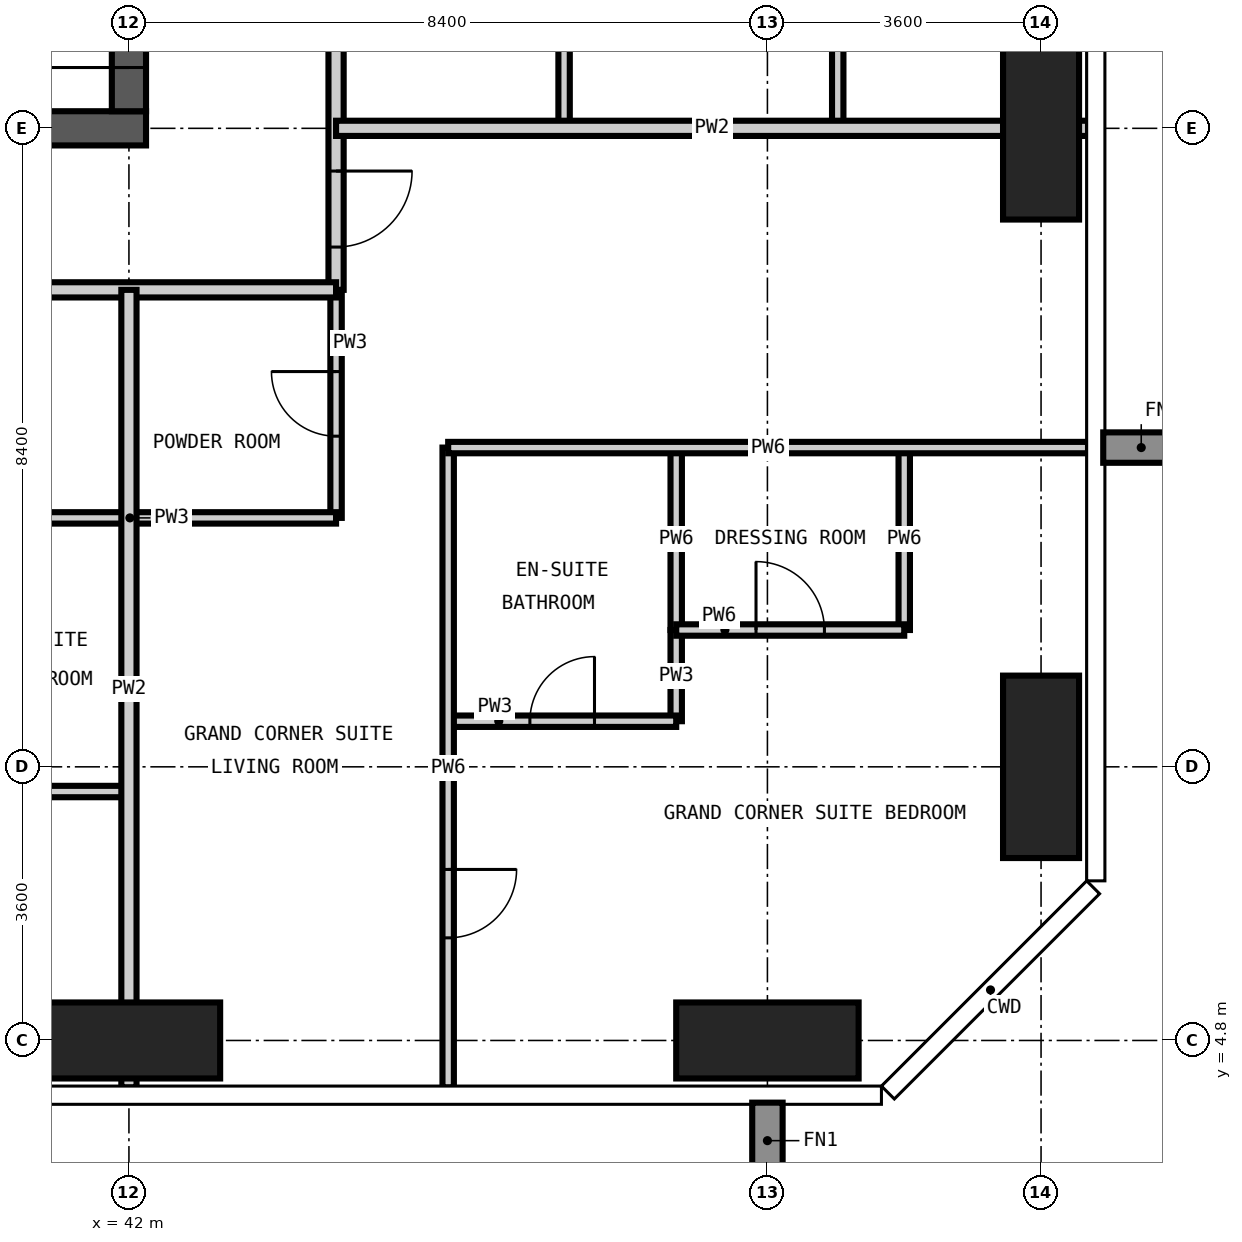
"""IFC4 building model, lengths in metres.
Left out: names, types, materials, properties, quantities, classifications, styles, units other than length and angle.
Written with IfcOpenShell. Run it as: python <this file> out.ifc"""

import sys

from ifc_helpers import new_model, si_unit, direction, frame, frame_2d, origin, origin_2d, place, context, subcontext, project, spatial, rectangle, extrude, element, fill, save


model = new_model("IFC4")
c1 = context("Model", 3, precision=1e-05, world=origin(), true_north=direction((0.0, 1.0)))
c2 = subcontext(c1, "Body", "Model", "MODEL_VIEW")
j1 = project(units=[si_unit("LENGTHUNIT", "METRE"), si_unit("PLANEANGLEUNIT", "RADIAN")], contexts=[c1])
p1 = place(None, origin())
s1 = spatial("IfcSite", under=j1, at=p1, CompositionType="ELEMENT")
p2 = place(p1, origin())
s2 = spatial("IfcBuilding", under=s1, at=p2, CompositionType="ELEMENT")
p3 = place(p2, frame((0.0, 0.0, 252.9)))
s3 = spatial("IfcBuildingStorey", under=s2, at=p3, CompositionType="ELEMENT", Elevation=252.9)
for number, where, z_axis, x_axis in (
    (1, (42.0, 4.8, -0.35), (0.0, 0.0, 1.0), (1.0, 0.0, 0.0)),
    (2, (50.4, 4.8, -0.35), (0.0, 0.0, 1.0), (1.0, 0.0, 0.0)),
):
    element("IfcColumn", number, at=place(p3, frame(where, z_axis=z_axis, x_axis=x_axis)), inside=s3, PredefinedType="COLUMN", context=c2, shape_type="SweptSolid", body=[
        extrude(rectangle(XDim=2.4, YDim=1.0, at=origin_2d()), origin(), (0.0, 0.0, 1.0), 3.9),
    ])
for number, where, z_axis, x_axis in (
    (3, (54.0, 8.4, -0.35), (0.0, 0.0, 1.0), (1.0, 0.0, 0.0)),
    (4, (54.0, 16.8, -0.35), (0.0, 0.0, 1.0), (1.0, 0.0, 0.0)),
):
    element("IfcColumn", number, at=place(p3, frame(where, z_axis=z_axis, x_axis=x_axis)), inside=s3, PredefinedType="COLUMN", context=c2, shape_type="SweptSolid", body=[
        extrude(rectangle(XDim=1.0, YDim=2.4, at=origin_2d()), origin(), (0.0, 0.0, 1.0), 3.9),
    ])
p4 = place(p3, frame((24.975, 16.8, -0.35), z_axis=(0.0, 0.0, 1.0), x_axis=(1.0, 0.0, 0.0)))
e5 = element("IfcWall", 5, at=p4, inside=s3, PredefinedType="SHEAR", context=c2, shape_type="SweptSolid", body=[
    extrude(rectangle(XDim=17.25, YDim=0.45, at=frame_2d((8.625, 0.0))), origin(), (0.0, 0.0, 1.0), 3.9),
])
p5 = place(p4, frame((3.925, 0.0, 0.35)))
e6 = element("IfcOpeningElement", 6, at=p5, cuts=e5, PredefinedType="OPENING", context=c2, shape_type="SweptSolid", body=[
    extrude(rectangle(XDim=1.0, YDim=2.1, at=frame_2d((0.5, 1.05))), frame((0.0, 0.235, 0.0), z_axis=(0.0, -1.0, 0.0), x_axis=(1.0, 0.0, 0.0)), (0.0, 0.0, 1.0), 0.47),
])
p6 = place(p4, frame((10.225, 0.0, 0.35)))
e7 = element("IfcOpeningElement", 7, at=p6, cuts=e5, PredefinedType="OPENING", context=c2, shape_type="SweptSolid", body=[
    extrude(rectangle(XDim=1.0, YDim=2.1, at=frame_2d((0.5, 1.05))), frame((0.0, 0.235, 0.0), z_axis=(0.0, -1.0, 0.0), x_axis=(1.0, 0.0, 0.0)), (0.0, 0.0, 1.0), 0.47),
])
p7 = place(p3, frame((42.0, 17.025, -0.35), z_axis=(0.0, 0.0, 1.0), x_axis=(0.0, 1.0, 0.0)))
e8 = element("IfcWall", 8, at=p7, inside=s3, PredefinedType="SHEAR", context=c2, shape_type="SweptSolid", body=[
    extrude(rectangle(XDim=24.75, YDim=0.45, at=frame_2d((12.375, 0.0))), origin(), (0.0, 0.0, 1.0), 3.9),
])
p8 = place(p7, frame((0.575, 0.0, 0.35)))
e9 = element("IfcOpeningElement", 9, at=p8, cuts=e8, PredefinedType="OPENING", context=c2, shape_type="SweptSolid", body=[
    extrude(rectangle(XDim=1.2, YDim=2.2, at=frame_2d((0.6, 1.1))), frame((0.0, 0.235, 0.0), z_axis=(0.0, -1.0, 0.0), x_axis=(1.0, 0.0, 0.0)), (0.0, 0.0, 1.0), 0.47),
])
p9 = place(p7, frame((11.475, 0.0, 0.35)))
e10 = element("IfcOpeningElement", 10, at=p9, cuts=e8, PredefinedType="OPENING", context=c2, shape_type="SweptSolid", body=[
    extrude(rectangle(XDim=1.8, YDim=2.2, at=frame_2d((0.9, 1.1))), frame((0.0, 0.235, 0.0), z_axis=(0.0, -1.0, 0.0), x_axis=(1.0, 0.0, 0.0)), (0.0, 0.0, 1.0), 0.47),
])
p10 = place(p7, frame((20.275, 0.0, 0.35)))
e11 = element("IfcOpeningElement", 11, at=p10, cuts=e8, PredefinedType="OPENING", context=c2, shape_type="SweptSolid", body=[
    extrude(rectangle(XDim=1.0, YDim=2.1, at=frame_2d((0.5, 1.05))), frame((0.0, 0.235, 0.0), z_axis=(0.0, -1.0, 0.0), x_axis=(1.0, 0.0, 0.0)), (0.0, 0.0, 1.0), 0.47),
])
p11 = place(p3, frame((44.725, 11.675, 0.0), z_axis=(0.0, 0.0, 1.0), x_axis=(0.0, 1.0, 0.0)))
e12 = element("IfcWall", 12, at=p11, inside=s3, PredefinedType="PARTITIONING", context=c2, shape_type="SweptSolid", body=[
    extrude(rectangle(XDim=3.0, YDim=0.15, at=frame_2d((1.5, 0.0))), origin(), (0.0, 0.0, 1.0), 3.55),
])
p12 = place(p11, frame((1.075, 0.0, 0.0)))
e13 = element("IfcOpeningElement", 13, at=p12, cuts=e12, PredefinedType="OPENING", context=c2, shape_type="SweptSolid", body=[
    extrude(rectangle(XDim=0.85, YDim=2.1, at=frame_2d((0.425, 1.05))), frame((0.0, 0.085, 0.0), z_axis=(0.0, -1.0, 0.0), x_axis=(1.0, 0.0, 0.0)), (0.0, 0.0, 1.0), 0.17),
])
p13 = place(p3, frame((47.725, 16.8, 0.0), z_axis=(0.0, 0.0, 1.0), x_axis=(0.0, 1.0, 0.0)))
e14 = element("IfcWall", 14, at=p13, inside=s3, PredefinedType="PARTITIONING", context=c2, shape_type="SweptSolid", body=[
    extrude(rectangle(XDim=2.7, YDim=0.15, at=frame_2d((1.35, 0.0))), origin(), (0.0, 0.0, 1.0), 3.55),
])
p14 = place(p3, frame((49.2, 9.0, 0.0), z_axis=(0.0, 0.0, 1.0), x_axis=(0.0, 1.0, 0.0)))
e15 = element("IfcWall", 15, at=p14, inside=s3, PredefinedType="PARTITIONING", context=c2, shape_type="SweptSolid", body=[
    extrude(rectangle(XDim=1.2, YDim=0.15, at=frame_2d((0.6, 0.0))), origin(), (0.0, 0.0, 1.0), 3.55),
])
for number, where, z_axis, x_axis in (
    (16, (51.325, 16.8, 0.0), (0.0, 0.0, 1.0), (0.0, 1.0, 0.0)),
    (17, (39.3, 8.075, 0.0), (0.0, 0.0, 1.0), (1.0, 0.0, 0.0)),
):
    element("IfcWall", number, at=place(p3, frame(where, z_axis=z_axis, x_axis=x_axis)), inside=s3, PredefinedType="PARTITIONING", context=c2, shape_type="SweptSolid", body=[
        extrude(rectangle(XDim=2.7, YDim=0.15, at=frame_2d((1.35, 0.0))), origin(), (0.0, 0.0, 1.0), 3.55),
    ])
p15 = place(p3, frame((46.2, 9.0, 0.0), z_axis=(0.0, 0.0, 1.0), x_axis=(1.0, 0.0, 0.0)))
e18 = element("IfcWall", 18, at=p15, inside=s3, PredefinedType="PARTITIONING", context=c2, shape_type="SweptSolid", body=[
    extrude(rectangle(XDim=3.0, YDim=0.15, at=frame_2d((1.5, 0.0))), origin(), (0.0, 0.0, 1.0), 3.55),
])
p16 = place(p15, frame((1.075, 0.0, 0.0)))
e19 = element("IfcOpeningElement", 19, at=p16, cuts=e18, PredefinedType="OPENING", context=c2, shape_type="SweptSolid", body=[
    extrude(rectangle(XDim=0.85, YDim=2.1, at=frame_2d((0.425, 1.05))), frame((0.0, 0.085, 0.0), z_axis=(0.0, -1.0, 0.0), x_axis=(1.0, 0.0, 0.0)), (0.0, 0.0, 1.0), 0.17),
])
p17 = place(p3, frame((39.3, 11.675, 0.0), z_axis=(0.0, 0.0, 1.0), x_axis=(1.0, 0.0, 0.0)))
e20 = element("IfcWall", 20, at=p17, inside=s3, PredefinedType="PARTITIONING", context=c2, shape_type="SweptSolid", body=[
    extrude(rectangle(XDim=5.425, YDim=0.15, at=frame_2d((2.712, 0.0))), origin(), (0.0, 0.0, 1.0), 3.55),
])
p18 = place(p3, frame((44.725, 29.4, 0.0), z_axis=(0.0, 0.0, 1.0), x_axis=(0.0, -1.0, 0.0)))
e21 = element("IfcWall", 21, at=p18, inside=s3, PredefinedType="PARTITIONING", context=c2, shape_type="SweptSolid", body=[
    extrude(rectangle(XDim=14.725, YDim=0.2, at=frame_2d((7.362, 0.0))), origin(), (0.0, 0.0, 1.0), 3.55),
])
p19 = place(p18, frame((5.8, 0.0, 0.0)))
e22 = element("IfcOpeningElement", 22, at=p19, cuts=e21, PredefinedType="OPENING", context=c2, shape_type="SweptSolid", body=[
    extrude(rectangle(XDim=1.0, YDim=2.2, at=frame_2d((0.5, 1.1))), frame((0.0, 0.11, 0.0), z_axis=(0.0, -1.0, 0.0), x_axis=(1.0, 0.0, 0.0)), (0.0, 0.0, 1.0), 0.22),
])
p20 = place(p18, frame((13.162, 0.0, 0.0)))
e23 = element("IfcOpeningElement", 23, at=p20, cuts=e21, PredefinedType="OPENING", context=c2, shape_type="SweptSolid", body=[
    extrude(rectangle(XDim=1.0, YDim=2.2, at=frame_2d((0.5, 1.1))), frame((0.0, 0.11, 0.0), z_axis=(0.0, -1.0, 0.0), x_axis=(1.0, 0.0, 0.0)), (0.0, 0.0, 1.0), 0.22),
])
p21 = place(p3, frame((44.725, 14.675, 0.0), z_axis=(0.0, 0.0, 1.0), x_axis=(-1.0, 0.0, 0.0)))
e24 = element("IfcWall", 24, at=p21, inside=s3, PredefinedType="PARTITIONING", context=c2, shape_type="SweptSolid", body=[
    extrude(rectangle(XDim=21.65, YDim=0.2, at=frame_2d((10.825, 0.0))), origin(), (0.0, 0.0, 1.0), 3.55),
])
p22 = place(p21, frame((11.825, 0.0, 0.0)))
e25 = element("IfcOpeningElement", 25, at=p22, cuts=e24, PredefinedType="OPENING", context=c2, shape_type="SweptSolid", body=[
    extrude(rectangle(XDim=1.0, YDim=2.2, at=frame_2d((0.5, 1.1))), frame((0.0, 0.11, 0.0), z_axis=(0.0, -1.0, 0.0), x_axis=(1.0, 0.0, 0.0)), (0.0, 0.0, 1.0), 0.22),
])
p23 = place(p3, frame((42.0, 4.182, 0.0), z_axis=(0.0, 0.0, 1.0), x_axis=(0.0, 1.0, 0.0)))
e26 = element("IfcWall", 26, at=p23, inside=s3, PredefinedType="PARTITIONING", context=c2, shape_type="SweptSolid", body=[
    extrude(rectangle(XDim=10.493, YDim=0.2, at=frame_2d((5.247, 0.0))), origin(), (0.0, 0.0, 1.0), 3.55),
])
p24 = place(p3, frame((44.725, 16.8, 0.0), z_axis=(0.0, 0.0, 1.0), x_axis=(1.0, 0.0, 0.0)))
e27 = element("IfcWall", 27, at=p24, inside=s3, PredefinedType="PARTITIONING", context=c2, shape_type="SweptSolid", body=[
    extrude(rectangle(XDim=9.893, YDim=0.2, at=frame_2d((4.946, 0.0))), origin(), (0.0, 0.0, 1.0), 3.55),
])
p25 = place(p3, frame((46.2, 4.182, 0.0), z_axis=(0.0, 0.0, 1.0), x_axis=(0.0, 1.0, 0.0)))
e28 = element("IfcWall", 28, at=p25, inside=s3, PredefinedType="PARTITIONING", context=c2, shape_type="SweptSolid", body=[
    extrude(rectangle(XDim=8.418, YDim=0.15, at=frame_2d((4.209, 0.0))), origin(), (0.0, 0.0, 1.0), 3.55),
])
p26 = place(p25, frame((1.968, 0.0, 0.0)))
e29 = element("IfcOpeningElement", 29, at=p26, cuts=e28, PredefinedType="OPENING", context=c2, shape_type="SweptSolid", body=[
    extrude(rectangle(XDim=0.9, YDim=2.1, at=frame_2d((0.45, 1.05))), frame((0.0, 0.085, 0.0), z_axis=(0.0, -1.0, 0.0), x_axis=(1.0, 0.0, 0.0)), (0.0, 0.0, 1.0), 0.17),
])
for number, where, z_axis, x_axis in (
    (30, (49.2, 10.2, 0.0), (0.0, 0.0, 1.0), (0.0, 1.0, 0.0)),
    (31, (52.2, 10.2, 0.0), (0.0, 0.0, 1.0), (0.0, 1.0, 0.0)),
):
    element("IfcWall", number, at=place(p3, frame(where, z_axis=z_axis, x_axis=x_axis)), inside=s3, PredefinedType="PARTITIONING", context=c2, shape_type="SweptSolid", body=[
        extrude(rectangle(XDim=2.4, YDim=0.15, at=frame_2d((1.2, 0.0))), origin(), (0.0, 0.0, 1.0), 3.55),
    ])
p27 = place(p3, frame((49.2, 10.2, 0.0), z_axis=(0.0, 0.0, 1.0), x_axis=(1.0, 0.0, 0.0)))
e32 = element("IfcWall", 32, at=p27, inside=s3, PredefinedType="PARTITIONING", context=c2, shape_type="SweptSolid", body=[
    extrude(rectangle(XDim=3.0, YDim=0.15, at=frame_2d((1.5, 0.0))), origin(), (0.0, 0.0, 1.0), 3.55),
])
p28 = place(p27, frame((1.05, 0.0, 0.0)))
e33 = element("IfcOpeningElement", 33, at=p28, cuts=e32, PredefinedType="OPENING", context=c2, shape_type="SweptSolid", body=[
    extrude(rectangle(XDim=0.9, YDim=2.1, at=frame_2d((0.45, 1.05))), frame((0.0, 0.085, 0.0), z_axis=(0.0, -1.0, 0.0), x_axis=(1.0, 0.0, 0.0)), (0.0, 0.0, 1.0), 0.17),
])
p29 = place(p3, frame((46.2, 12.6, 0.0), z_axis=(0.0, 0.0, 1.0), x_axis=(1.0, 0.0, 0.0)))
e34 = element("IfcWall", 34, at=p29, inside=s3, PredefinedType="PARTITIONING", context=c2, shape_type="SweptSolid", body=[
    extrude(rectangle(XDim=8.418, YDim=0.15, at=frame_2d((4.209, 0.0))), origin(), (0.0, 0.0, 1.0), 3.55),
])
p30 = place(p8, origin())
e35 = element("IfcDoor", 35, at=p30, inside=s3, OperationType="SINGLE_SWING_LEFT", PredefinedType="DOOR", context=c2, shape_type="SweptSolid", body=[
    extrude(rectangle(XDim=1.2, YDim=2.2, at=frame_2d((0.6, 1.1))), frame((0.0, 0.025, 0.0), z_axis=(0.0, -1.0, 0.0), x_axis=(1.0, 0.0, 0.0)), (0.0, 0.0, 1.0), 0.05),
])
fill(e9, e35)
p31 = place(p20, origin())
e36 = element("IfcDoor", 36, at=p31, inside=s3, OperationType="SINGLE_SWING_LEFT", PredefinedType="DOOR", context=c2, shape_type="SweptSolid", body=[
    extrude(rectangle(XDim=1.0, YDim=2.2, at=frame_2d((0.5, 1.1))), frame((0.0, 0.025, 0.0), z_axis=(0.0, -1.0, 0.0), x_axis=(1.0, 0.0, 0.0)), (0.0, 0.0, 1.0), 0.05),
])
fill(e23, e36)
p32 = place(p12, origin())
e37 = element("IfcDoor", 37, at=p32, inside=s3, OperationType="SINGLE_SWING_RIGHT", PredefinedType="DOOR", context=c2, shape_type="SweptSolid", body=[
    extrude(rectangle(XDim=0.85, YDim=2.1, at=frame_2d((0.425, 1.05))), frame((0.0, 0.025, 0.0), z_axis=(0.0, -1.0, 0.0), x_axis=(1.0, 0.0, 0.0)), (0.0, 0.0, 1.0), 0.05),
])
fill(e13, e37)
p33 = place(p26, frame((0.9, 0.0, 0.0), z_axis=(0.0, 0.0, 1.0), x_axis=(-1.0, 0.0, 0.0)))
e38 = element("IfcDoor", 38, at=p33, inside=s3, OperationType="SINGLE_SWING_LEFT", PredefinedType="DOOR", context=c2, shape_type="SweptSolid", body=[
    extrude(rectangle(XDim=0.9, YDim=2.1, at=frame_2d((0.45, 1.05))), frame((0.0, 0.025, 0.0), z_axis=(0.0, -1.0, 0.0), x_axis=(1.0, 0.0, 0.0)), (0.0, 0.0, 1.0), 0.05),
])
fill(e29, e38)
p34 = place(p16, origin())
e39 = element("IfcDoor", 39, at=p34, inside=s3, OperationType="SINGLE_SWING_RIGHT", PredefinedType="DOOR", context=c2, shape_type="SweptSolid", body=[
    extrude(rectangle(XDim=0.85, YDim=2.1, at=frame_2d((0.425, 1.05))), frame((0.0, 0.025, 0.0), z_axis=(0.0, -1.0, 0.0), x_axis=(1.0, 0.0, 0.0)), (0.0, 0.0, 1.0), 0.05),
])
fill(e19, e39)
p35 = place(p28, origin())
e40 = element("IfcDoor", 40, at=p35, inside=s3, OperationType="SINGLE_SWING_LEFT", PredefinedType="DOOR", context=c2, shape_type="SweptSolid", body=[
    extrude(rectangle(XDim=0.9, YDim=2.1, at=frame_2d((0.45, 1.05))), frame((0.0, 0.025, 0.0), z_axis=(0.0, -1.0, 0.0), x_axis=(1.0, 0.0, 0.0)), (0.0, 0.0, 1.0), 0.05),
])
fill(e33, e40)
save(model, sys.argv[1])
